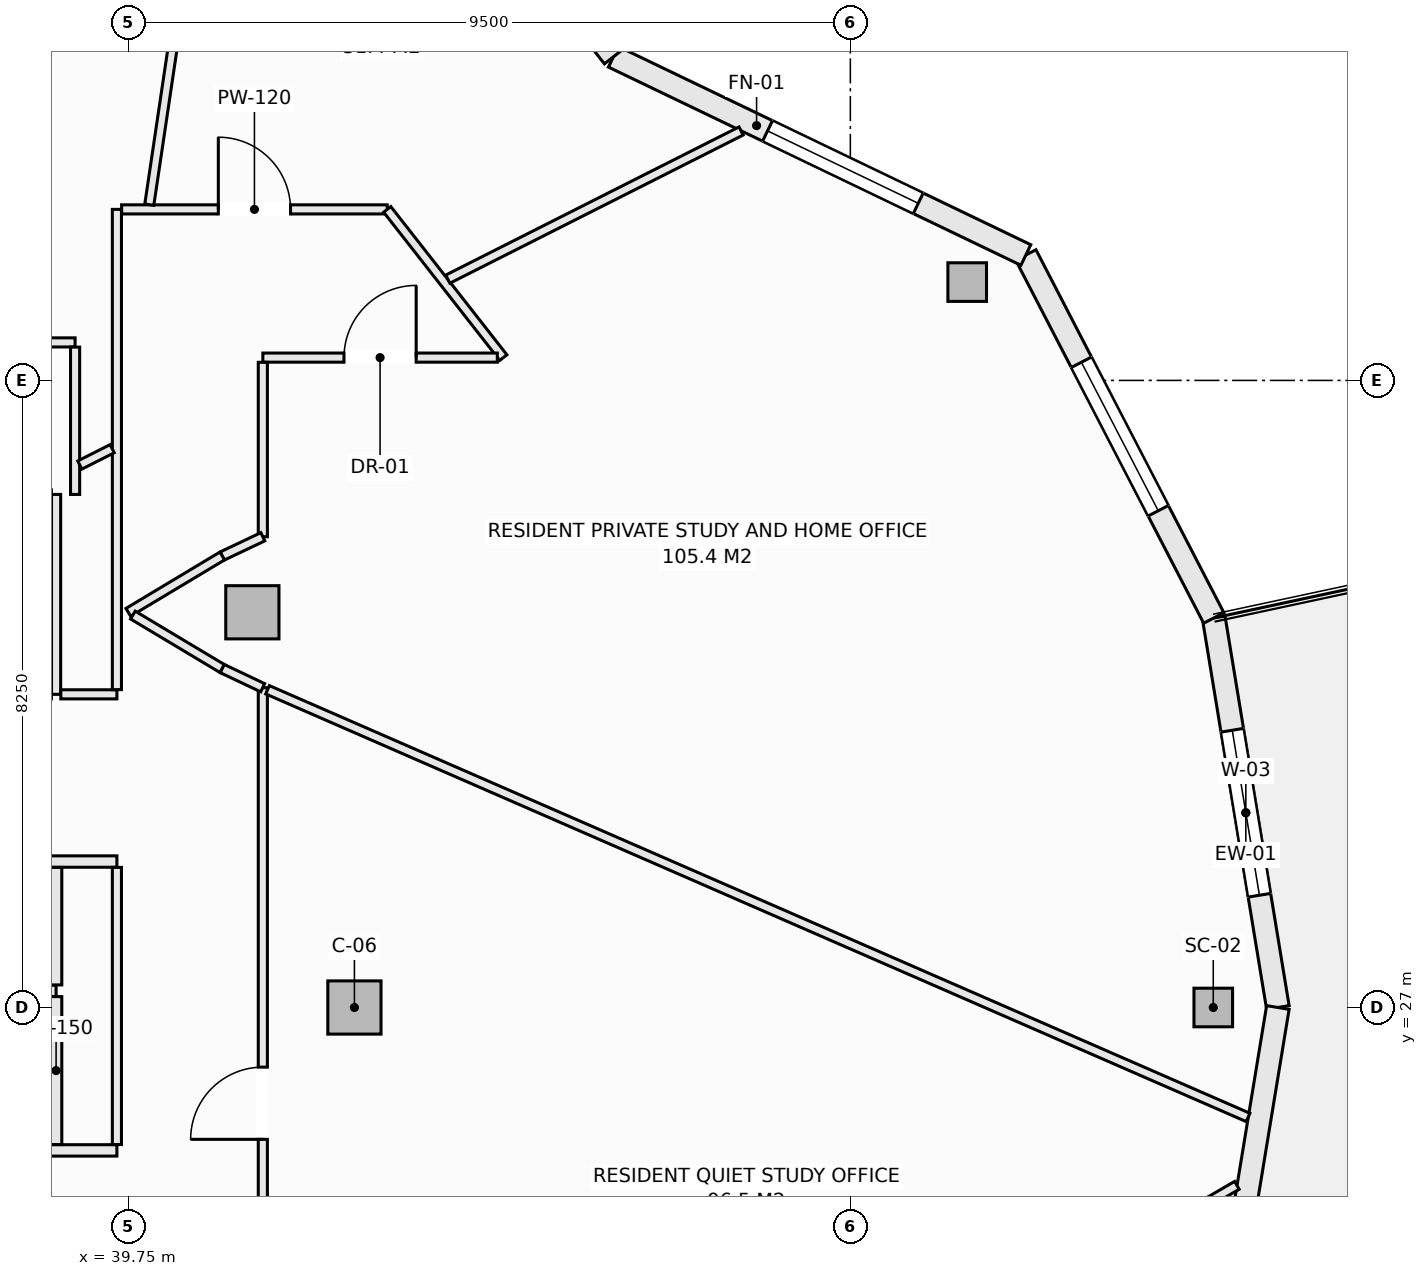
"""IFC4 building model, lengths in metres.
Left out: names, types, materials, properties, quantities, classifications, styles, units other than length and angle.
Written with IfcOpenShell. Run it as: python <this file> out.ifc"""

import sys

from ifc_helpers import new_model, si_unit, direction, frame, frame_2d, origin, origin_2d, place, context, subcontext, project, spatial, rectangle, hollow_rectangle, extrude, element, fill, save


model = new_model("IFC4")
c1 = context("Model", 3, precision=1e-05, world=origin(), true_north=direction((0.0, 1.0)))
c2 = subcontext(c1, "Body", "Model", "MODEL_VIEW")
j1 = project(units=[si_unit("LENGTHUNIT", "METRE"), si_unit("PLANEANGLEUNIT", "RADIAN")], contexts=[c1])
p1 = place(None, origin())
s1 = spatial("IfcSite", under=j1, at=p1, CompositionType="ELEMENT")
p2 = place(p1, origin())
s2 = spatial("IfcBuilding", under=s1, at=p2, CompositionType="ELEMENT")
p3 = place(p2, frame((0.0, 0.0, 229.4)))
s3 = spatial("IfcBuildingStorey", under=s2, at=p3, CompositionType="ELEMENT", Elevation=229.4)
for number, where, z_axis, x_axis in (
    (1, (54.025, 27.0, -0.27), (0.0, 0.0, 1.0), (1.0, 0.0, 0.0)),
    (2, (50.787, 36.544, -0.27), (0.0, 0.0, 1.0), (1.0, 0.0, 0.0)),
):
    element("IfcColumn", number, at=place(p3, frame(where, z_axis=z_axis, x_axis=x_axis)), inside=s3, PredefinedType="COLUMN", context=c2, shape_type="SweptSolid", body=[
        extrude(hollow_rectangle(XDim=0.508, YDim=0.508, WallThickness=0.019, at=origin_2d()), origin(), (0.0, 0.0, 1.0), 3.3),
    ])
for number, where, z_axis, x_axis in (
    (3, (42.725, 27.0, -0.27), (0.0, 0.0, 1.0), (1.0, 0.0, 0.0)),
    (4, (41.382, 32.199, -0.27), (0.0, 0.0, 1.0), (1.0, 0.0, 0.0)),
):
    element("IfcColumn", number, at=place(p3, frame(where, z_axis=z_axis, x_axis=x_axis)), inside=s3, PredefinedType="COLUMN", context=c2, shape_type="SweptSolid", body=[
        extrude(rectangle(XDim=0.7, YDim=0.7, at=origin_2d()), origin(), (0.0, 0.0, 1.0), 3.3),
    ])
p4 = place(p3, frame((54.032, 32.125, 0.0), z_axis=(0.0, 0.0, 1.0), x_axis=(0.16237087798, -0.986729799886, 0.0)))
e5 = element("IfcWall", 5, at=p4, inside=s3, PredefinedType="SOLIDWALL", context=c2, shape_type="SweptSolid", body=[
    extrude(rectangle(XDim=5.193, YDim=0.3, at=frame_2d((2.597, 0.0))), origin(), (0.0, 0.0, 1.0), 2.605),
])
p5 = place(p4, frame((1.497, 0.0, 0.72)))
e6 = element("IfcOpeningElement", 6, at=p5, cuts=e5, PredefinedType="OPENING", context=c2, shape_type="SweptSolid", body=[
    extrude(rectangle(XDim=2.2, YDim=1.65, at=frame_2d((1.1, 0.825))), frame((0.0, 0.16, 0.0), z_axis=(0.0, -1.0, 0.0), x_axis=(1.0, 0.0, 0.0)), (0.0, 0.0, 1.0), 0.32),
])
p6 = place(p3, frame((51.559, 36.9, 0.0), z_axis=(0.0, 0.0, 1.0), x_axis=(0.459808219482, -0.888018243786, 0.0)))
e7 = element("IfcWall", 7, at=p6, inside=s3, PredefinedType="SOLIDWALL", context=c2, shape_type="SweptSolid", body=[
    extrude(rectangle(XDim=5.378, YDim=0.3, at=frame_2d((2.689, 0.0))), origin(), (0.0, 0.0, 1.0), 2.605),
])
p7 = place(p6, frame((1.589, 0.0, 0.72)))
e8 = element("IfcOpeningElement", 8, at=p7, cuts=e7, PredefinedType="OPENING", context=c2, shape_type="SweptSolid", body=[
    extrude(rectangle(XDim=2.2, YDim=1.65, at=frame_2d((1.1, 0.825))), frame((0.0, 0.16, 0.0), z_axis=(0.0, -1.0, 0.0), x_axis=(1.0, 0.0, 0.0)), (0.0, 0.0, 1.0), 0.32),
])
p8 = place(p3, frame((46.133, 39.507, 0.0), z_axis=(0.0, 0.0, 1.0), x_axis=(0.901348331142, -0.433094892545, 0.0)))
e9 = element("IfcWall", 9, at=p8, inside=s3, PredefinedType="SOLIDWALL", context=c2, shape_type="SweptSolid", body=[
    extrude(rectangle(XDim=6.021, YDim=0.3, at=frame_2d((3.01, 0.0))), origin(), (0.0, 0.0, 1.0), 2.605),
])
p9 = place(p8, frame((2.25, 0.0, 0.72)))
e10 = element("IfcOpeningElement", 10, at=p9, cuts=e9, PredefinedType="OPENING", context=c2, shape_type="SweptSolid", body=[
    extrude(rectangle(XDim=2.2, YDim=1.65, at=frame_2d((1.1, 0.825))), frame((0.0, 0.16, 0.0), z_axis=(0.0, -1.0, 0.0), x_axis=(1.0, 0.0, 0.0)), (0.0, 0.0, 1.0), 0.32),
])
p10 = place(p3, frame((42.5, 44.147, 0.0), z_axis=(0.0, 0.0, 1.0), x_axis=(0.616450126935, -0.787393955401, 0.0)))
e11 = element("IfcWall", 11, at=p10, inside=s3, PredefinedType="SOLIDWALL", context=c2, shape_type="SweptSolid", body=[
    extrude(rectangle(XDim=5.893, YDim=0.3, at=frame_2d((2.946, 0.0))), origin(), (0.0, 0.0, 1.0), 2.605),
])
p11 = place(p10, frame((1.846, 0.0, 0.72)))
e12 = element("IfcOpeningElement", 12, at=p11, cuts=e11, PredefinedType="OPENING", context=c2, shape_type="SweptSolid", body=[
    extrude(rectangle(XDim=2.2, YDim=1.65, at=frame_2d((1.1, 0.825))), frame((0.0, 0.16, 0.0), z_axis=(0.0, -1.0, 0.0), x_axis=(1.0, 0.0, 0.0)), (0.0, 0.0, 1.0), 0.32),
])
p12 = place(p3, frame((54.032, 21.875, 0.0), z_axis=(0.0, 0.0, 1.0), x_axis=(0.16237087798, 0.986729799886, 0.0)))
e13 = element("IfcWall", 13, at=p12, inside=s3, PredefinedType="SOLIDWALL", context=c2, shape_type="SweptSolid", body=[
    extrude(rectangle(XDim=5.193, YDim=0.3, at=frame_2d((2.597, 0.0))), origin(), (0.0, 0.0, 1.0), 2.605),
])
p13 = place(p12, frame((0.5, 0.0, 0.0)))
e14 = element("IfcOpeningElement", 14, at=p13, cuts=e13, PredefinedType="OPENING", context=c2, shape_type="SweptSolid", body=[
    extrude(rectangle(XDim=1.2, YDim=2.2, at=frame_2d((0.6, 1.1))), frame((0.0, 0.16, 0.0), z_axis=(0.0, -1.0, 0.0), x_axis=(1.0, 0.0, 0.0)), (0.0, 0.0, 1.0), 0.32),
])
p14 = place(p3, frame((30.077, 28.92, 0.0), z_axis=(0.0, 0.0, 1.0), x_axis=(1.0, 0.0, 0.0)))
e15 = element("IfcWall", 15, at=p14, inside=s3, PredefinedType="PARTITIONING", context=c2, shape_type="SweptSolid", body=[
    extrude(rectangle(XDim=9.523, YDim=0.15, at=frame_2d((4.762, 0.0))), origin(), (0.0, 0.0, 1.0), 3.03),
])
p15 = place(p14, frame((1.342, 0.0, 0.0)))
e16 = element("IfcOpeningElement", 16, at=p15, cuts=e15, PredefinedType="OPENING", context=c2, shape_type="SweptSolid", body=[
    extrude(rectangle(XDim=0.95, YDim=2.1, at=frame_2d((0.475, 1.05))), frame((0.0, 0.085, 0.0), z_axis=(0.0, -1.0, 0.0), x_axis=(1.0, 0.0, 0.0)), (0.0, 0.0, 1.0), 0.17),
])
p16 = place(p14, frame((5.498, 0.0, 0.0)))
e17 = element("IfcOpeningElement", 17, at=p16, cuts=e15, PredefinedType="OPENING", context=c2, shape_type="SweptSolid", body=[
    extrude(rectangle(XDim=0.95, YDim=2.1, at=frame_2d((0.475, 1.05))), frame((0.0, 0.085, 0.0), z_axis=(0.0, -1.0, 0.0), x_axis=(1.0, 0.0, 0.0)), (0.0, 0.0, 1.0), 0.17),
])
p17 = place(p3, frame((33.377, 25.12, 0.0), z_axis=(0.0, 0.0, 1.0), x_axis=(1.0, 0.0, 0.0)))
e18 = element("IfcWall", 18, at=p17, inside=s3, PredefinedType="PARTITIONING", context=c2, shape_type="SweptSolid", body=[
    extrude(rectangle(XDim=6.223, YDim=0.15, at=frame_2d((3.112, 0.0))), origin(), (0.0, 0.0, 1.0), 3.03),
])
p18 = place(p17, frame((2.441, 0.0, 0.0)))
e19 = element("IfcOpeningElement", 19, at=p18, cuts=e18, PredefinedType="OPENING", context=c2, shape_type="SweptSolid", body=[
    extrude(rectangle(XDim=0.95, YDim=2.1, at=frame_2d((0.475, 1.05))), frame((0.0, 0.085, 0.0), z_axis=(0.0, -1.0, 0.0), x_axis=(1.0, 0.0, 0.0)), (0.0, 0.0, 1.0), 0.17),
])
p19 = place(p3, frame((33.377, 27.22, 0.0), z_axis=(0.0, 0.0, 1.0), x_axis=(1.0, 0.0, 0.0)))
e20 = element("IfcWall", 20, at=p19, inside=s3, PredefinedType="PARTITIONING", context=c2, shape_type="SweptSolid", body=[
    extrude(rectangle(XDim=5.423, YDim=0.15, at=frame_2d((2.711, 0.0))), origin(), (0.0, 0.0, 1.0), 3.03),
])
p20 = place(p3, frame((38.8, 25.197, 0.0), z_axis=(0.0, 0.0, 1.0), x_axis=(0.0, 1.0, 0.0)))
e21 = element("IfcWall", 21, at=p20, inside=s3, PredefinedType="PARTITIONING", context=c2, shape_type="SweptSolid", body=[
    extrude(rectangle(XDim=1.946, YDim=0.15, at=frame_2d((0.973, 0.0))), origin(), (0.0, 0.0, 1.0), 3.03),
])
p21 = place(p3, frame((38.8, 27.297, 0.0), z_axis=(0.0, 0.0, 1.0), x_axis=(0.0, 1.0, 0.0)))
e22 = element("IfcWall", 22, at=p21, inside=s3, PredefinedType="PARTITIONING", context=c2, shape_type="SweptSolid", body=[
    extrude(rectangle(XDim=1.546, YDim=0.15, at=frame_2d((0.773, 0.0))), origin(), (0.0, 0.0, 1.0), 3.03),
])
p22 = place(p3, frame((38.8, 31.12, 0.0), z_axis=(0.0, 0.0, 1.0), x_axis=(0.0, 1.0, 0.0)))
e23 = element("IfcWall", 23, at=p22, inside=s3, PredefinedType="PARTITIONING", context=c2, shape_type="SweptSolid", body=[
    extrude(rectangle(XDim=2.63, YDim=0.12, at=frame_2d((1.315, 0.0))), origin(), (0.0, 0.0, 1.0), 3.03),
])
p23 = place(p3, frame((38.862, 31.12, 0.0), z_axis=(0.0, 0.0, 1.0), x_axis=(1.0, 0.0, 0.0)))
e24 = element("IfcWall", 24, at=p23, inside=s3, PredefinedType="PARTITIONING", context=c2, shape_type="SweptSolid", body=[
    extrude(rectangle(XDim=0.738, YDim=0.12, at=frame_2d((0.369, 0.0))), origin(), (0.0, 0.0, 1.0), 3.03),
])
p24 = place(p3, frame((34.025, 35.75, 0.0), z_axis=(0.0, 0.0, 1.0), x_axis=(1.0, 0.0, 0.0)))
e25 = element("IfcWall", 25, at=p24, inside=s3, PredefinedType="PARTITIONING", context=c2, shape_type="SweptSolid", body=[
    extrude(rectangle(XDim=5.025, YDim=0.12, at=frame_2d((2.513, 0.0))), origin(), (0.0, 0.0, 1.0), 2.478),
])
p25 = place(p24, frame((1.617, 0.0, 0.0)))
e26 = element("IfcOpeningElement", 26, at=p25, cuts=e25, PredefinedType="OPENING", context=c2, shape_type="SweptSolid", body=[
    extrude(rectangle(XDim=0.95, YDim=2.1, at=frame_2d((0.475, 1.05))), frame((0.0, 0.07, 0.0), z_axis=(0.0, -1.0, 0.0), x_axis=(1.0, 0.0, 0.0)), (0.0, 0.0, 1.0), 0.14),
])
p26 = place(p3, frame((39.05, 33.75, 0.0), z_axis=(0.0, 0.0, 1.0), x_axis=(0.0, 1.0, 0.0)))
e27 = element("IfcWall", 27, at=p26, inside=s3, PredefinedType="PARTITIONING", context=c2, shape_type="SweptSolid", body=[
    extrude(rectangle(XDim=1.938, YDim=0.12, at=frame_2d((0.969, 0.0))), origin(), (0.0, 0.0, 1.0), 3.03),
])
p27 = place(p3, frame((39.6, 25.197, 0.0), z_axis=(0.0, 0.0, 1.0), x_axis=(0.0, 1.0, 0.0)))
e28 = element("IfcWall", 28, at=p27, inside=s3, PredefinedType="PARTITIONING", context=c2, shape_type="SweptSolid", body=[
    extrude(rectangle(XDim=3.646, YDim=0.12, at=frame_2d((1.823, 0.0))), origin(), (0.0, 0.0, 1.0), 3.03),
])
p28 = place(p3, frame((39.6, 31.182, 0.0), z_axis=(0.0, 0.0, 1.0), x_axis=(0.0, 1.0, 0.0)))
e29 = element("IfcWall", 29, at=p28, inside=s3, PredefinedType="PARTITIONING", context=c2, shape_type="SweptSolid", body=[
    extrude(rectangle(XDim=6.318, YDim=0.12, at=frame_2d((3.159, 0.0))), origin(), (0.0, 0.0, 1.0), 3.03),
])
p29 = place(p3, frame((39.662, 37.5, 0.0), z_axis=(0.0, 0.0, 1.0), x_axis=(1.0, 0.0, 0.0)))
e30 = element("IfcWall", 30, at=p29, inside=s3, PredefinedType="PARTITIONING", context=c2, shape_type="SweptSolid", body=[
    extrude(rectangle(XDim=3.495, YDim=0.12, at=frame_2d((1.748, 0.0))), origin(), (0.0, 0.0, 1.0), 2.77),
])
p30 = place(p29, frame((1.272, 0.0, 0.0)))
e31 = element("IfcOpeningElement", 31, at=p30, cuts=e30, PredefinedType="OPENING", context=c2, shape_type="SweptSolid", body=[
    extrude(rectangle(XDim=0.95, YDim=2.1, at=frame_2d((0.475, 1.05))), frame((0.0, 0.07, 0.0), z_axis=(0.0, -1.0, 0.0), x_axis=(1.0, 0.0, 0.0)), (0.0, 0.0, 1.0), 0.14),
])
p31 = place(p3, frame((43.157, 37.5, 0.0), z_axis=(0.0, 0.0, 1.0), x_axis=(0.616571357052, -0.78729902938, 0.0)))
e32 = element("IfcWall", 32, at=p31, inside=s3, PredefinedType="PARTITIONING", context=c2, shape_type="SweptSolid", body=[
    extrude(rectangle(XDim=2.477, YDim=0.12, at=frame_2d((1.238, 0.0))), origin(), (0.0, 0.0, 1.0), 3.03),
])
p32 = place(p3, frame((41.52, 35.55, 0.0), z_axis=(0.0, 0.0, 1.0), x_axis=(1.0, 0.0, 0.0)))
e33 = element("IfcWall", 33, at=p32, inside=s3, PredefinedType="PARTITIONING", context=c2, shape_type="SweptSolid", body=[
    extrude(rectangle(XDim=3.085, YDim=0.12, at=frame_2d((1.542, 0.0))), origin(), (0.0, 0.0, 1.0), 3.03),
])
p33 = place(p32, frame((1.068, 0.0, 0.0)))
e34 = element("IfcOpeningElement", 34, at=p33, cuts=e33, PredefinedType="OPENING", context=c2, shape_type="SweptSolid", body=[
    extrude(rectangle(XDim=0.95, YDim=2.1, at=frame_2d((0.475, 1.05))), frame((0.0, 0.07, 0.0), z_axis=(0.0, -1.0, 0.0), x_axis=(1.0, 0.0, 0.0)), (0.0, 0.0, 1.0), 0.14),
])
p34 = place(p3, frame((41.52, 22.794, 0.0), z_axis=(0.0, 0.0, 1.0), x_axis=(0.0, 1.0, 0.0)))
e35 = element("IfcWall", 35, at=p34, inside=s3, PredefinedType="PARTITIONING", context=c2, shape_type="SweptSolid", body=[
    extrude(rectangle(XDim=8.413, YDim=0.12, at=frame_2d((4.207, 0.0))), origin(), (0.0, 0.0, 1.0), 2.478),
])
p35 = place(p34, frame((2.471, 0.0, 0.0)))
e36 = element("IfcOpeningElement", 36, at=p35, cuts=e35, PredefinedType="OPENING", context=c2, shape_type="SweptSolid", body=[
    extrude(rectangle(XDim=0.95, YDim=2.1, at=frame_2d((0.475, 1.05))), frame((0.0, 0.07, 0.0), z_axis=(0.0, -1.0, 0.0), x_axis=(1.0, 0.0, 0.0)), (0.0, 0.0, 1.0), 0.14),
])
p36 = place(p3, frame((41.52, 33.193, 0.0), z_axis=(0.0, 0.0, 1.0), x_axis=(0.0, 1.0, 0.0)))
e37 = element("IfcWall", 37, at=p36, inside=s3, PredefinedType="PARTITIONING", context=c2, shape_type="SweptSolid", body=[
    extrude(rectangle(XDim=2.295, YDim=0.12, at=frame_2d((1.147, 0.0))), origin(), (0.0, 0.0, 1.0), 3.03),
])
p37 = place(p3, frame((40.986, 32.94, 0.0), z_axis=(0.0, 0.0, 1.0), x_axis=(0.90356951601, 0.428441512621, 0.0)))
e38 = element("IfcWall", 38, at=p37, inside=s3, PredefinedType="PARTITIONING", context=c2, shape_type="SweptSolid", body=[
    extrude(rectangle(XDim=0.591, YDim=0.12, at=frame_2d((0.295, 0.0))), origin(), (0.0, 0.0, 1.0), 3.03),
])
p38 = place(p3, frame((39.75, 32.199, 0.0), z_axis=(0.0, 0.0, 1.0), x_axis=(0.857702120906, 0.514146935996, 0.0)))
e39 = element("IfcWall", 39, at=p38, inside=s3, PredefinedType="PARTITIONING", context=c2, shape_type="SweptSolid", body=[
    extrude(rectangle(XDim=1.441, YDim=0.12, at=frame_2d((0.721, 0.0))), origin(), (0.0, 0.0, 1.0), 3.03),
])
p39 = place(p3, frame((39.81, 32.163, 0.0), z_axis=(0.0, 0.0, 1.0), x_axis=(0.858011245414, -0.513630901273, 0.0)))
e40 = element("IfcWall", 40, at=p39, inside=s3, PredefinedType="PARTITIONING", context=c2, shape_type="SweptSolid", body=[
    extrude(rectangle(XDim=1.37, YDim=0.12, at=frame_2d((0.685, 0.0))), origin(), (0.0, 0.0, 1.0), 3.03),
])
p40 = place(p3, frame((40.986, 31.459, 0.0), z_axis=(0.0, 0.0, 1.0), x_axis=(0.903687141457, -0.428193356283, 0.0)))
e41 = element("IfcWall", 41, at=p40, inside=s3, PredefinedType="PARTITIONING", context=c2, shape_type="SweptSolid", body=[
    extrude(rectangle(XDim=0.588, YDim=0.12, at=frame_2d((0.294, 0.0))), origin(), (0.0, 0.0, 1.0), 3.03),
])
p41 = place(p3, frame((43.773, 18.512, 0.0), z_axis=(0.0, 0.0, 1.0), x_axis=(0.864261022419, 0.503043621495, 0.0)))
e42 = element("IfcWall", 42, at=p41, inside=s3, PredefinedType="PARTITIONING", context=c2, shape_type="SweptSolid", body=[
    extrude(rectangle(XDim=12.222, YDim=0.12, at=frame_2d((6.111, 0.0))), origin(), (0.0, 0.0, 1.0), 3.03),
])
p42 = place(p3, frame((41.582, 31.18, 0.0), z_axis=(0.0, 0.0, 1.0), x_axis=(0.916624100851, -0.399750244202, 0.0)))
e43 = element("IfcWall", 43, at=p42, inside=s3, PredefinedType="PARTITIONING", context=c2, shape_type="SweptSolid", body=[
    extrude(rectangle(XDim=14.074, YDim=0.12, at=frame_2d((7.037, 0.0))), origin(), (0.0, 0.0, 1.0), 2.478),
])
p43 = place(p3, frame((39.112, 34.137, 0.0), z_axis=(0.0, 0.0, 1.0), x_axis=(0.892681104984, 0.450688855869, 0.0)))
e44 = element("IfcWall", 44, at=p43, inside=s3, PredefinedType="PARTITIONING", context=c2, shape_type="SweptSolid", body=[
    extrude(rectangle(XDim=0.477, YDim=0.12, at=frame_2d((0.239, 0.0))), origin(), (0.0, 0.0, 1.0), 3.03),
])
p44 = place(p3, frame((43.954, 36.583, 0.0), z_axis=(0.0, 0.0, 1.0), x_axis=(0.892589792595, 0.450869673139, 0.0)))
e45 = element("IfcWall", 45, at=p44, inside=s3, PredefinedType="PARTITIONING", context=c2, shape_type="SweptSolid", body=[
    extrude(rectangle(XDim=4.323, YDim=0.12, at=frame_2d((2.161, 0.0))), origin(), (0.0, 0.0, 1.0), 3.03),
])
p45 = place(p3, frame((40.026, 37.562, 0.0), z_axis=(0.0, 0.0, 1.0), x_axis=(0.147138038827, 0.989115967685, 0.0)))
e46 = element("IfcWall", 46, at=p45, inside=s3, PredefinedType="PARTITIONING", context=c2, shape_type="SweptSolid", body=[
    extrude(rectangle(XDim=6.98, YDim=0.12, at=frame_2d((3.49, 0.0))), origin(), (0.0, 0.0, 1.0), 2.478),
])
p46 = place(p5, origin())
e47 = element("IfcWindow", 47, at=p46, inside=s3, PartitioningType="SINGLE_PANEL", PredefinedType="WINDOW", context=c2, shape_type="SweptSolid", body=[
    extrude(rectangle(XDim=2.2, YDim=1.65, at=frame_2d((1.1, 0.825))), frame((0.0, 0.03, 0.0), z_axis=(0.0, -1.0, 0.0), x_axis=(1.0, 0.0, 0.0)), (0.0, 0.0, 1.0), 0.06),
])
fill(e6, e47)
p47 = place(p7, origin())
e48 = element("IfcWindow", 48, at=p47, inside=s3, PartitioningType="SINGLE_PANEL", PredefinedType="WINDOW", context=c2, shape_type="SweptSolid", body=[
    extrude(rectangle(XDim=2.2, YDim=1.65, at=frame_2d((1.1, 0.825))), frame((0.0, 0.03, 0.0), z_axis=(0.0, -1.0, 0.0), x_axis=(1.0, 0.0, 0.0)), (0.0, 0.0, 1.0), 0.06),
])
fill(e8, e48)
p48 = place(p9, origin())
e49 = element("IfcWindow", 49, at=p48, inside=s3, PartitioningType="SINGLE_PANEL", PredefinedType="WINDOW", context=c2, shape_type="SweptSolid", body=[
    extrude(rectangle(XDim=2.2, YDim=1.65, at=frame_2d((1.1, 0.825))), frame((0.0, 0.03, 0.0), z_axis=(0.0, -1.0, 0.0), x_axis=(1.0, 0.0, 0.0)), (0.0, 0.0, 1.0), 0.06),
])
fill(e10, e49)
p49 = place(p35, origin())
e50 = element("IfcDoor", 50, at=p49, inside=s3, OperationType="SINGLE_SWING_LEFT", PredefinedType="DOOR", context=c2, shape_type="SweptSolid", body=[
    extrude(rectangle(XDim=0.95, YDim=2.1, at=frame_2d((0.475, 1.05))), frame((0.0, 0.025, 0.0), z_axis=(0.0, -1.0, 0.0), x_axis=(1.0, 0.0, 0.0)), (0.0, 0.0, 1.0), 0.05),
])
fill(e36, e50)
p50 = place(p33, origin())
e51 = element("IfcDoor", 51, at=p50, inside=s3, OperationType="SINGLE_SWING_RIGHT", PredefinedType="DOOR", context=c2, shape_type="SweptSolid", body=[
    extrude(rectangle(XDim=0.95, YDim=2.1, at=frame_2d((0.475, 1.05))), frame((0.0, 0.025, 0.0), z_axis=(0.0, -1.0, 0.0), x_axis=(1.0, 0.0, 0.0)), (0.0, 0.0, 1.0), 0.05),
])
fill(e34, e51)
p51 = place(p30, origin())
e52 = element("IfcDoor", 52, at=p51, inside=s3, OperationType="SINGLE_SWING_LEFT", PredefinedType="DOOR", context=c2, shape_type="SweptSolid", body=[
    extrude(rectangle(XDim=0.95, YDim=2.1, at=frame_2d((0.475, 1.05))), frame((0.0, 0.025, 0.0), z_axis=(0.0, -1.0, 0.0), x_axis=(1.0, 0.0, 0.0)), (0.0, 0.0, 1.0), 0.05),
])
fill(e31, e52)
save(model, sys.argv[1])
